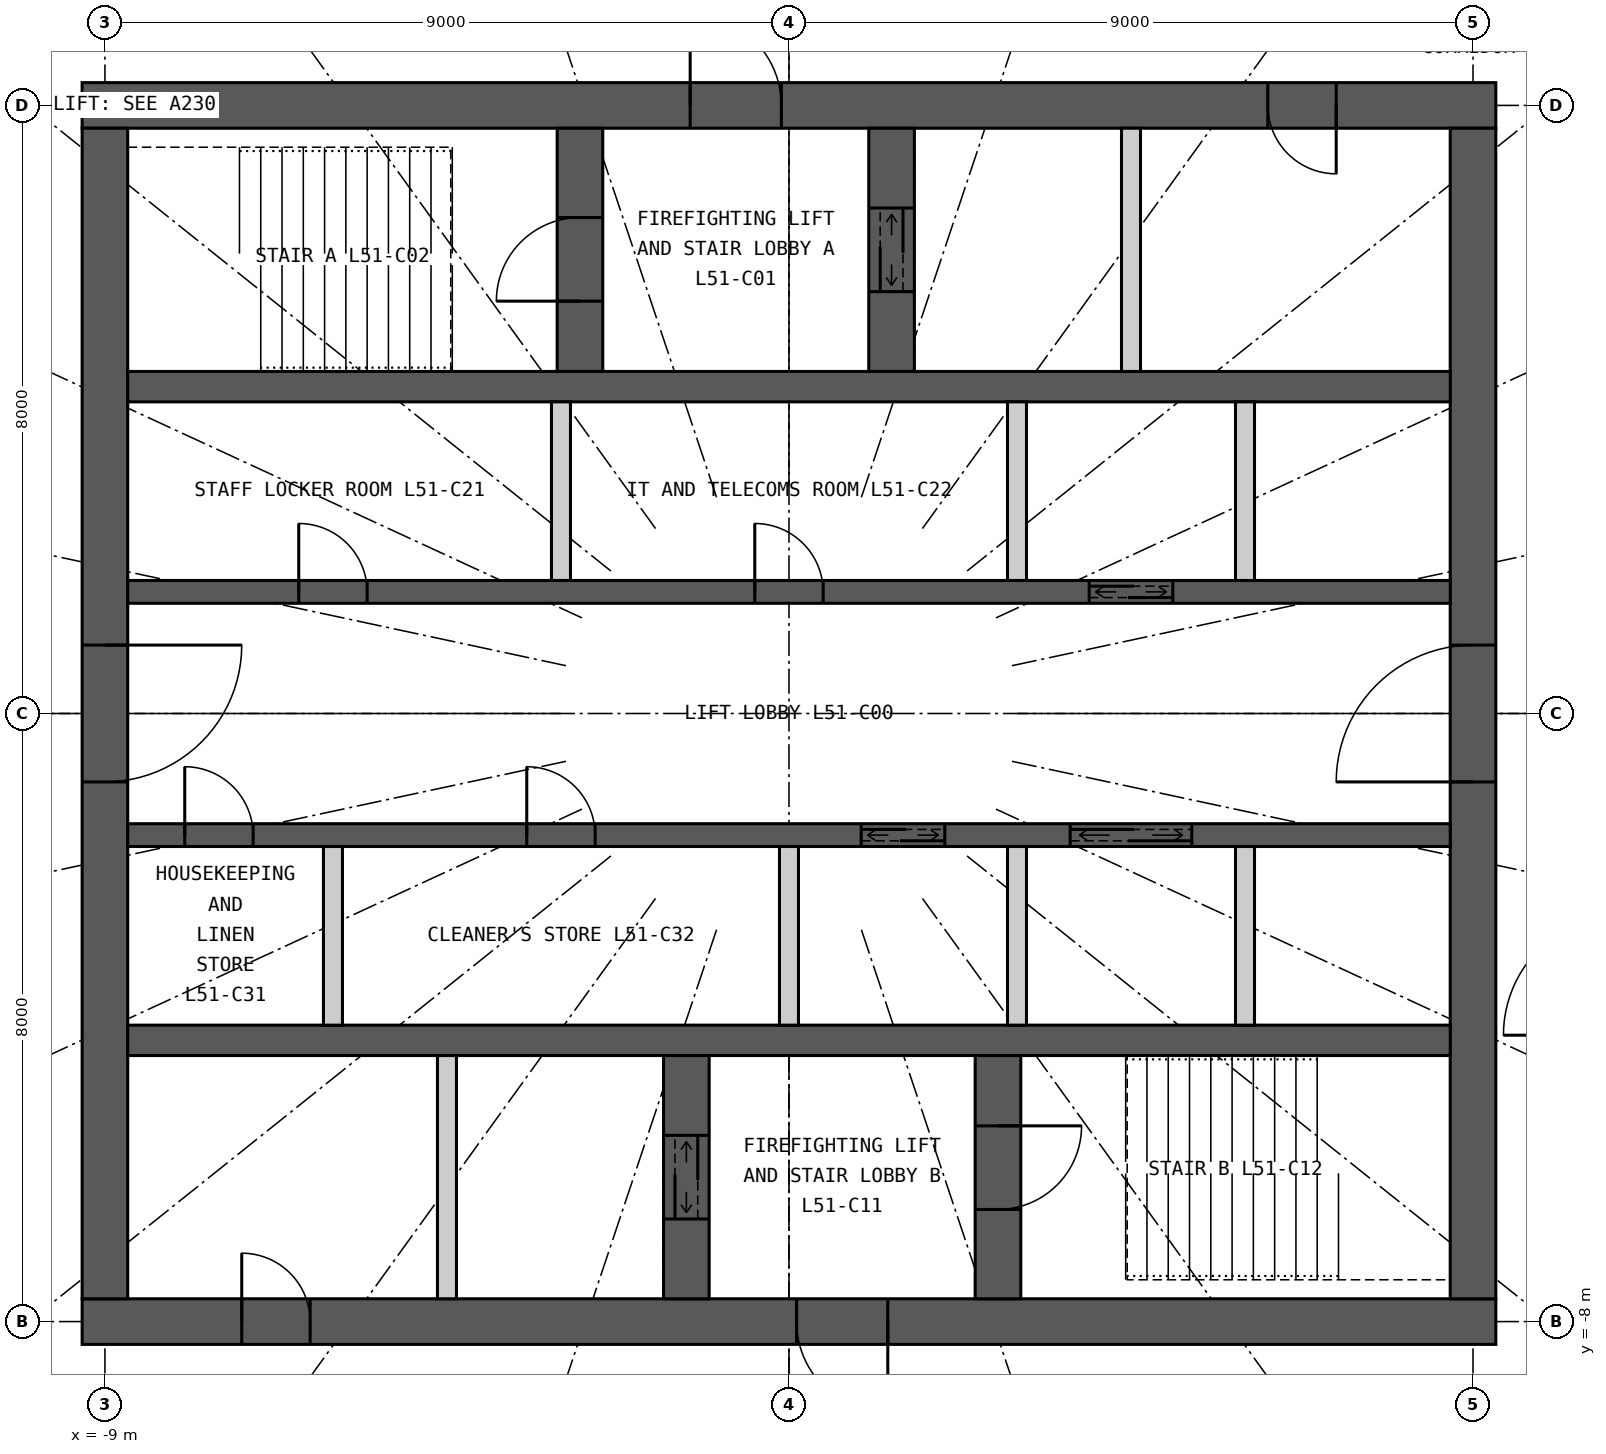
"""IFC4 building model, lengths in metres.
Left out: names, types, materials, properties, quantities, classifications, styles, units other than length and angle.
Written with IfcOpenShell. Run it as: python <this file> out.ifc"""

import sys

from ifc_helpers import new_model, si_unit, direction, frame, frame_2d, origin, place, context, subcontext, project, spatial, rectangle, extrude, element, fill, save


model = new_model("IFC4")
c1 = context("Model", 3, precision=1e-05, world=origin(), true_north=direction((0.0, 1.0)))
c2 = subcontext(c1, "Body", "Model", "MODEL_VIEW")
j1 = project(units=[si_unit("LENGTHUNIT", "METRE"), si_unit("PLANEANGLEUNIT", "RADIAN")], contexts=[c1])
p1 = place(None, origin())
s1 = spatial("IfcSite", under=j1, at=p1, CompositionType="ELEMENT")
p2 = place(p1, origin())
s2 = spatial("IfcBuilding", under=s1, at=p2, CompositionType="ELEMENT")
p3 = place(p2, frame((0.0, 0.0, 192.9)))
s3 = spatial("IfcBuildingStorey", under=s2, at=p3, CompositionType="ELEMENT", Elevation=192.9)
p4 = place(p3, frame((-9.3, 8.0, 0.0), z_axis=(0.0, 0.0, 1.0), x_axis=(1.0, 0.0, 0.0)))
e1 = element("IfcWall", 1, at=p4, inside=s3, PredefinedType="SHEAR", context=c2, shape_type="SweptSolid", body=[
    extrude(rectangle(XDim=18.6, YDim=0.6, at=frame_2d((9.3, 0.0))), origin(), (0.0, 0.0, 1.0), 3.3),
])
p5 = place(p4, frame((8.0, 0.0, 0.0)))
e2 = element("IfcOpeningElement", 2, at=p5, cuts=e1, PredefinedType="OPENING", context=c2, shape_type="SweptSolid", body=[
    extrude(rectangle(XDim=1.2, YDim=2.2, at=frame_2d((0.6, 1.1))), frame((0.0, 0.31, 0.0), z_axis=(0.0, -1.0, 0.0), x_axis=(1.0, 0.0, 0.0)), (0.0, 0.0, 1.0), 0.62),
])
p6 = place(p4, frame((15.6, 0.0, 0.0)))
e3 = element("IfcOpeningElement", 3, at=p6, cuts=e1, PredefinedType="OPENING", context=c2, shape_type="SweptSolid", body=[
    extrude(rectangle(XDim=0.9, YDim=2.2, at=frame_2d((0.45, 1.1))), frame((0.0, 0.31, 0.0), z_axis=(0.0, -1.0, 0.0), x_axis=(1.0, 0.0, 0.0)), (0.0, 0.0, 1.0), 0.62),
])
p7 = place(p3, frame((9.3, -8.0, 0.0), z_axis=(0.0, 0.0, 1.0), x_axis=(-1.0, 0.0, 0.0)))
e4 = element("IfcWall", 4, at=p7, inside=s3, PredefinedType="SHEAR", context=c2, shape_type="SweptSolid", body=[
    extrude(rectangle(XDim=18.6, YDim=0.6, at=frame_2d((9.3, 0.0))), origin(), (0.0, 0.0, 1.0), 3.3),
])
p8 = place(p7, frame((8.0, 0.0, 0.0)))
e5 = element("IfcOpeningElement", 5, at=p8, cuts=e4, PredefinedType="OPENING", context=c2, shape_type="SweptSolid", body=[
    extrude(rectangle(XDim=1.2, YDim=2.2, at=frame_2d((0.6, 1.1))), frame((0.0, 0.31, 0.0), z_axis=(0.0, -1.0, 0.0), x_axis=(1.0, 0.0, 0.0)), (0.0, 0.0, 1.0), 0.62),
])
p9 = place(p7, frame((15.6, 0.0, 0.0)))
e6 = element("IfcOpeningElement", 6, at=p9, cuts=e4, PredefinedType="OPENING", context=c2, shape_type="SweptSolid", body=[
    extrude(rectangle(XDim=0.9, YDim=2.2, at=frame_2d((0.45, 1.1))), frame((0.0, 0.31, 0.0), z_axis=(0.0, -1.0, 0.0), x_axis=(1.0, 0.0, 0.0)), (0.0, 0.0, 1.0), 0.62),
])
p10 = place(p3, frame((9.0, -7.7, 0.0), z_axis=(0.0, 0.0, 1.0), x_axis=(0.0, 1.0, 0.0)))
e7 = element("IfcWall", 7, at=p10, inside=s3, PredefinedType="SHEAR", context=c2, shape_type="SweptSolid", body=[
    extrude(rectangle(XDim=15.4, YDim=0.6, at=frame_2d((7.7, 0.0))), origin(), (0.0, 0.0, 1.0), 3.3),
])
p11 = place(p10, frame((6.8, 0.0, 0.0)))
e8 = element("IfcOpeningElement", 8, at=p11, cuts=e7, PredefinedType="OPENING", context=c2, shape_type="SweptSolid", body=[
    extrude(rectangle(XDim=1.8, YDim=2.2, at=frame_2d((0.9, 1.1))), frame((0.0, 0.31, 0.0), z_axis=(0.0, -1.0, 0.0), x_axis=(1.0, 0.0, 0.0)), (0.0, 0.0, 1.0), 0.62),
])
p12 = place(p3, frame((-9.0, 7.7, 0.0), z_axis=(0.0, 0.0, 1.0), x_axis=(0.0, -1.0, 0.0)))
e9 = element("IfcWall", 9, at=p12, inside=s3, PredefinedType="SHEAR", context=c2, shape_type="SweptSolid", body=[
    extrude(rectangle(XDim=15.4, YDim=0.6, at=frame_2d((7.7, 0.0))), origin(), (0.0, 0.0, 1.0), 3.3),
])
p13 = place(p12, frame((6.8, 0.0, 0.0)))
e10 = element("IfcOpeningElement", 10, at=p13, cuts=e9, PredefinedType="OPENING", context=c2, shape_type="SweptSolid", body=[
    extrude(rectangle(XDim=1.8, YDim=2.2, at=frame_2d((0.9, 1.1))), frame((0.0, 0.31, 0.0), z_axis=(0.0, -1.0, 0.0), x_axis=(1.0, 0.0, 0.0)), (0.0, 0.0, 1.0), 0.62),
])
p14 = place(p3, frame((-8.7, 4.3, 0.0), z_axis=(0.0, 0.0, 1.0), x_axis=(1.0, 0.0, 0.0)))
e11 = element("IfcWall", 11, at=p14, inside=s3, PredefinedType="SHEAR", context=c2, shape_type="SweptSolid", body=[
    extrude(rectangle(XDim=17.4, YDim=0.4, at=frame_2d((8.7, 0.0))), origin(), (0.0, 0.0, 1.0), 3.3),
])
p15 = place(p3, frame((-8.7, 1.6, 0.0), z_axis=(0.0, 0.0, 1.0), x_axis=(1.0, 0.0, 0.0)))
e12 = element("IfcWall", 12, at=p15, inside=s3, PredefinedType="SHEAR", context=c2, shape_type="SweptSolid", body=[
    extrude(rectangle(XDim=17.4, YDim=0.3, at=frame_2d((8.7, 0.0))), origin(), (0.0, 0.0, 1.0), 3.3),
])
p16 = place(p15, frame((12.65, 0.0, 0.0)))
e13 = element("IfcOpeningElement", 13, at=p16, cuts=e12, PredefinedType="OPENING", context=c2, shape_type="SweptSolid", body=[
    extrude(rectangle(XDim=1.1, YDim=2.2, at=frame_2d((0.55, 1.1))), frame((0.0, 0.16, 0.0), z_axis=(0.0, -1.0, 0.0), x_axis=(1.0, 0.0, 0.0)), (0.0, 0.0, 1.0), 0.32),
])
p17 = place(p15, frame((2.25, 0.0, 0.0)))
e14 = element("IfcOpeningElement", 14, at=p17, cuts=e12, PredefinedType="OPENING", context=c2, shape_type="SweptSolid", body=[
    extrude(rectangle(XDim=0.9, YDim=2.2, at=frame_2d((0.45, 1.1))), frame((0.0, 0.16, 0.0), z_axis=(0.0, -1.0, 0.0), x_axis=(1.0, 0.0, 0.0)), (0.0, 0.0, 1.0), 0.32),
])
p18 = place(p15, frame((8.25, 0.0, 0.0)))
e15 = element("IfcOpeningElement", 15, at=p18, cuts=e12, PredefinedType="OPENING", context=c2, shape_type="SweptSolid", body=[
    extrude(rectangle(XDim=0.9, YDim=2.2, at=frame_2d((0.45, 1.1))), frame((0.0, 0.16, 0.0), z_axis=(0.0, -1.0, 0.0), x_axis=(1.0, 0.0, 0.0)), (0.0, 0.0, 1.0), 0.32),
])
p19 = place(p3, frame((-8.7, -4.3, 0.0), z_axis=(0.0, 0.0, 1.0), x_axis=(1.0, 0.0, 0.0)))
e16 = element("IfcWall", 16, at=p19, inside=s3, PredefinedType="SHEAR", context=c2, shape_type="SweptSolid", body=[
    extrude(rectangle(XDim=17.4, YDim=0.4, at=frame_2d((8.7, 0.0))), origin(), (0.0, 0.0, 1.0), 3.3),
])
p20 = place(p3, frame((-8.7, -1.6, 0.0), z_axis=(0.0, 0.0, 1.0), x_axis=(1.0, 0.0, 0.0)))
e17 = element("IfcWall", 17, at=p20, inside=s3, PredefinedType="SHEAR", context=c2, shape_type="SweptSolid", body=[
    extrude(rectangle(XDim=17.4, YDim=0.3, at=frame_2d((8.7, 0.0))), origin(), (0.0, 0.0, 1.0), 3.3),
])
p21 = place(p20, frame((9.65, 0.0, 0.0)))
e18 = element("IfcOpeningElement", 18, at=p21, cuts=e17, PredefinedType="OPENING", context=c2, shape_type="SweptSolid", body=[
    extrude(rectangle(XDim=1.1, YDim=2.2, at=frame_2d((0.55, 1.1))), frame((0.0, 0.16, 0.0), z_axis=(0.0, -1.0, 0.0), x_axis=(1.0, 0.0, 0.0)), (0.0, 0.0, 1.0), 0.32),
])
p22 = place(p20, frame((12.4, 0.0, 0.0)))
e19 = element("IfcOpeningElement", 19, at=p22, cuts=e17, PredefinedType="OPENING", context=c2, shape_type="SweptSolid", body=[
    extrude(rectangle(XDim=1.6, YDim=2.4, at=frame_2d((0.8, 1.2))), frame((0.0, 0.16, 0.0), z_axis=(0.0, -1.0, 0.0), x_axis=(1.0, 0.0, 0.0)), (0.0, 0.0, 1.0), 0.32),
])
p23 = place(p20, frame((0.75, 0.0, 0.0)))
e20 = element("IfcOpeningElement", 20, at=p23, cuts=e17, PredefinedType="OPENING", context=c2, shape_type="SweptSolid", body=[
    extrude(rectangle(XDim=0.9, YDim=2.2, at=frame_2d((0.45, 1.1))), frame((0.0, 0.16, 0.0), z_axis=(0.0, -1.0, 0.0), x_axis=(1.0, 0.0, 0.0)), (0.0, 0.0, 1.0), 0.32),
])
p24 = place(p20, frame((5.25, 0.0, 0.0)))
e21 = element("IfcOpeningElement", 21, at=p24, cuts=e17, PredefinedType="OPENING", context=c2, shape_type="SweptSolid", body=[
    extrude(rectangle(XDim=0.9, YDim=2.2, at=frame_2d((0.45, 1.1))), frame((0.0, 0.16, 0.0), z_axis=(0.0, -1.0, 0.0), x_axis=(1.0, 0.0, 0.0)), (0.0, 0.0, 1.0), 0.32),
])
p25 = place(p3, frame((-2.75, 4.5, 0.0), z_axis=(0.0, 0.0, 1.0), x_axis=(0.0, 1.0, 0.0)))
e22 = element("IfcWall", 22, at=p25, inside=s3, PredefinedType="SHEAR", context=c2, shape_type="SweptSolid", body=[
    extrude(rectangle(XDim=3.2, YDim=0.6, at=frame_2d((1.6, 0.0))), origin(), (0.0, 0.0, 1.0), 3.3),
])
p26 = place(p25, frame((0.925, 0.0, 0.0)))
e23 = element("IfcOpeningElement", 23, at=p26, cuts=e22, PredefinedType="OPENING", context=c2, shape_type="SweptSolid", body=[
    extrude(rectangle(XDim=1.1, YDim=2.2, at=frame_2d((0.55, 1.1))), frame((0.0, 0.31, 0.0), z_axis=(0.0, -1.0, 0.0), x_axis=(1.0, 0.0, 0.0)), (0.0, 0.0, 1.0), 0.62),
])
p27 = place(p3, frame((1.35, 4.5, 0.0), z_axis=(0.0, 0.0, 1.0), x_axis=(0.0, 1.0, 0.0)))
e24 = element("IfcWall", 24, at=p27, inside=s3, PredefinedType="SHEAR", context=c2, shape_type="SweptSolid", body=[
    extrude(rectangle(XDim=3.2, YDim=0.6, at=frame_2d((1.6, 0.0))), origin(), (0.0, 0.0, 1.0), 3.3),
])
p28 = place(p27, frame((1.05, 0.0, 0.0)))
e25 = element("IfcOpeningElement", 25, at=p28, cuts=e24, PredefinedType="OPENING", context=c2, shape_type="SweptSolid", body=[
    extrude(rectangle(XDim=1.1, YDim=2.2, at=frame_2d((0.55, 1.1))), frame((0.0, 0.31, 0.0), z_axis=(0.0, -1.0, 0.0), x_axis=(1.0, 0.0, 0.0)), (0.0, 0.0, 1.0), 0.62),
])
p29 = place(p3, frame((4.5, 4.5, 0.0), z_axis=(0.0, 0.0, 1.0), x_axis=(0.0, 1.0, 0.0)))
e26 = element("IfcWall", 26, at=p29, inside=s3, PredefinedType="PARTITIONING", context=c2, shape_type="SweptSolid", body=[
    extrude(rectangle(XDim=3.2, YDim=0.25, at=frame_2d((1.6, 0.0))), origin(), (0.0, 0.0, 1.0), 3.3),
])
p30 = place(p3, frame((2.75, -7.7, 0.0), z_axis=(0.0, 0.0, 1.0), x_axis=(0.0, 1.0, 0.0)))
e27 = element("IfcWall", 27, at=p30, inside=s3, PredefinedType="SHEAR", context=c2, shape_type="SweptSolid", body=[
    extrude(rectangle(XDim=3.2, YDim=0.6, at=frame_2d((1.6, 0.0))), origin(), (0.0, 0.0, 1.0), 3.3),
])
p31 = place(p30, frame((1.175, 0.0, 0.0)))
e28 = element("IfcOpeningElement", 28, at=p31, cuts=e27, PredefinedType="OPENING", context=c2, shape_type="SweptSolid", body=[
    extrude(rectangle(XDim=1.1, YDim=2.2, at=frame_2d((0.55, 1.1))), frame((0.0, 0.31, 0.0), z_axis=(0.0, -1.0, 0.0), x_axis=(1.0, 0.0, 0.0)), (0.0, 0.0, 1.0), 0.62),
])
p32 = place(p3, frame((-1.35, -7.7, 0.0), z_axis=(0.0, 0.0, 1.0), x_axis=(0.0, 1.0, 0.0)))
e29 = element("IfcWall", 29, at=p32, inside=s3, PredefinedType="SHEAR", context=c2, shape_type="SweptSolid", body=[
    extrude(rectangle(XDim=3.2, YDim=0.6, at=frame_2d((1.6, 0.0))), origin(), (0.0, 0.0, 1.0), 3.3),
])
p33 = place(p32, frame((1.05, 0.0, 0.0)))
e30 = element("IfcOpeningElement", 30, at=p33, cuts=e29, PredefinedType="OPENING", context=c2, shape_type="SweptSolid", body=[
    extrude(rectangle(XDim=1.1, YDim=2.2, at=frame_2d((0.55, 1.1))), frame((0.0, 0.31, 0.0), z_axis=(0.0, -1.0, 0.0), x_axis=(1.0, 0.0, 0.0)), (0.0, 0.0, 1.0), 0.62),
])
p34 = place(p3, frame((-4.5, -7.7, 0.0), z_axis=(0.0, 0.0, 1.0), x_axis=(0.0, 1.0, 0.0)))
e31 = element("IfcWall", 31, at=p34, inside=s3, PredefinedType="PARTITIONING", context=c2, shape_type="SweptSolid", body=[
    extrude(rectangle(XDim=3.2, YDim=0.25, at=frame_2d((1.6, 0.0))), origin(), (0.0, 0.0, 1.0), 3.3),
])
for number, where, z_axis, x_axis in (
    (32, (-3.0, 1.75, 0.0), (0.0, 0.0, 1.0), (0.0, 1.0, 0.0)),
    (33, (3.0, 1.75, 0.0), (0.0, 0.0, 1.0), (0.0, 1.0, 0.0)),
    (34, (6.0, 1.75, 0.0), (0.0, 0.0, 1.0), (0.0, 1.0, 0.0)),
    (35, (-6.0, -4.1, 0.0), (0.0, 0.0, 1.0), (0.0, 1.0, 0.0)),
    (36, (0.0, -4.1, 0.0), (0.0, 0.0, 1.0), (0.0, 1.0, 0.0)),
    (37, (3.0, -4.1, 0.0), (0.0, 0.0, 1.0), (0.0, 1.0, 0.0)),
    (38, (6.0, -4.1, 0.0), (0.0, 0.0, 1.0), (0.0, 1.0, 0.0)),
):
    element("IfcWall", number, at=place(p3, frame(where, z_axis=z_axis, x_axis=x_axis)), inside=s3, PredefinedType="PARTITIONING", context=c2, shape_type="SweptSolid", body=[
        extrude(rectangle(XDim=2.35, YDim=0.25, at=frame_2d((1.175, 0.0))), origin(), (0.0, 0.0, 1.0), 3.3),
    ])
p35 = place(p5, origin())
e39 = element("IfcDoor", 39, at=p35, inside=s3, OperationType="SINGLE_SWING_LEFT", PredefinedType="DOOR", context=c2, shape_type="SweptSolid", body=[
    extrude(rectangle(XDim=1.2, YDim=2.2, at=frame_2d((0.6, 1.1))), frame((0.0, 0.025, 0.0), z_axis=(0.0, -1.0, 0.0), x_axis=(1.0, 0.0, 0.0)), (0.0, 0.0, 1.0), 0.05),
])
fill(e2, e39)
p36 = place(p26, origin())
e40 = element("IfcDoor", 40, at=p36, inside=s3, OperationType="SINGLE_SWING_LEFT", PredefinedType="DOOR", context=c2, shape_type="SweptSolid", body=[
    extrude(rectangle(XDim=1.1, YDim=2.2, at=frame_2d((0.55, 1.1))), frame((0.0, 0.025, 0.0), z_axis=(0.0, -1.0, 0.0), x_axis=(1.0, 0.0, 0.0)), (0.0, 0.0, 1.0), 0.05),
])
fill(e23, e40)
p37 = place(p28, origin())
e41 = element("IfcDoor", 41, at=p37, inside=s3, OperationType="DOUBLE_DOOR_SLIDING", PredefinedType="DOOR", context=c2, shape_type="SweptSolid", body=[
    extrude(rectangle(XDim=1.1, YDim=2.2, at=frame_2d((0.55, 1.1))), frame((0.0, 0.025, 0.0), z_axis=(0.0, -1.0, 0.0), x_axis=(1.0, 0.0, 0.0)), (0.0, 0.0, 1.0), 0.05),
])
fill(e25, e41)
p38 = place(p6, origin())
e42 = element("IfcDoor", 42, at=p38, inside=s3, OperationType="SINGLE_SWING_RIGHT", PredefinedType="DOOR", context=c2, shape_type="SweptSolid", body=[
    extrude(rectangle(XDim=0.9, YDim=2.2, at=frame_2d((0.45, 1.1))), frame((0.0, 0.025, 0.0), z_axis=(0.0, -1.0, 0.0), x_axis=(1.0, 0.0, 0.0)), (0.0, 0.0, 1.0), 0.05),
])
fill(e3, e42)
p39 = place(p8, origin())
e43 = element("IfcDoor", 43, at=p39, inside=s3, OperationType="SINGLE_SWING_LEFT", PredefinedType="DOOR", context=c2, shape_type="SweptSolid", body=[
    extrude(rectangle(XDim=1.2, YDim=2.2, at=frame_2d((0.6, 1.1))), frame((0.0, 0.025, 0.0), z_axis=(0.0, -1.0, 0.0), x_axis=(1.0, 0.0, 0.0)), (0.0, 0.0, 1.0), 0.05),
])
fill(e5, e43)
p40 = place(p31, origin())
e44 = element("IfcDoor", 44, at=p40, inside=s3, OperationType="SINGLE_SWING_RIGHT", PredefinedType="DOOR", context=c2, shape_type="SweptSolid", body=[
    extrude(rectangle(XDim=1.1, YDim=2.2, at=frame_2d((0.55, 1.1))), frame((0.0, 0.025, 0.0), z_axis=(0.0, -1.0, 0.0), x_axis=(1.0, 0.0, 0.0)), (0.0, 0.0, 1.0), 0.05),
])
fill(e28, e44)
p41 = place(p33, origin())
e45 = element("IfcDoor", 45, at=p41, inside=s3, OperationType="DOUBLE_DOOR_SLIDING", PredefinedType="DOOR", context=c2, shape_type="SweptSolid", body=[
    extrude(rectangle(XDim=1.1, YDim=2.2, at=frame_2d((0.55, 1.1))), frame((0.0, 0.025, 0.0), z_axis=(0.0, -1.0, 0.0), x_axis=(1.0, 0.0, 0.0)), (0.0, 0.0, 1.0), 0.05),
])
fill(e30, e45)
p42 = place(p9, origin())
e46 = element("IfcDoor", 46, at=p42, inside=s3, OperationType="SINGLE_SWING_RIGHT", PredefinedType="DOOR", context=c2, shape_type="SweptSolid", body=[
    extrude(rectangle(XDim=0.9, YDim=2.2, at=frame_2d((0.45, 1.1))), frame((0.0, 0.025, 0.0), z_axis=(0.0, -1.0, 0.0), x_axis=(1.0, 0.0, 0.0)), (0.0, 0.0, 1.0), 0.05),
])
fill(e6, e46)
p43 = place(p16, origin())
e47 = element("IfcDoor", 47, at=p43, inside=s3, OperationType="DOUBLE_DOOR_SLIDING", PredefinedType="DOOR", context=c2, shape_type="SweptSolid", body=[
    extrude(rectangle(XDim=1.1, YDim=2.2, at=frame_2d((0.55, 1.1))), frame((0.0, 0.025, 0.0), z_axis=(0.0, -1.0, 0.0), x_axis=(1.0, 0.0, 0.0)), (0.0, 0.0, 1.0), 0.05),
])
fill(e13, e47)
p44 = place(p21, origin())
e48 = element("IfcDoor", 48, at=p44, inside=s3, OperationType="DOUBLE_DOOR_SLIDING", PredefinedType="DOOR", context=c2, shape_type="SweptSolid", body=[
    extrude(rectangle(XDim=1.1, YDim=2.2, at=frame_2d((0.55, 1.1))), frame((0.0, 0.025, 0.0), z_axis=(0.0, -1.0, 0.0), x_axis=(1.0, 0.0, 0.0)), (0.0, 0.0, 1.0), 0.05),
])
fill(e18, e48)
p45 = place(p22, origin())
e49 = element("IfcDoor", 49, at=p45, inside=s3, OperationType="DOUBLE_DOOR_SLIDING", PredefinedType="DOOR", context=c2, shape_type="SweptSolid", body=[
    extrude(rectangle(XDim=1.6, YDim=2.4, at=frame_2d((0.8, 1.2))), frame((0.0, 0.025, 0.0), z_axis=(0.0, -1.0, 0.0), x_axis=(1.0, 0.0, 0.0)), (0.0, 0.0, 1.0), 0.05),
])
fill(e19, e49)
p46 = place(p17, origin())
e50 = element("IfcDoor", 50, at=p46, inside=s3, OperationType="SINGLE_SWING_LEFT", PredefinedType="DOOR", context=c2, shape_type="SweptSolid", body=[
    extrude(rectangle(XDim=0.9, YDim=2.2, at=frame_2d((0.45, 1.1))), frame((0.0, 0.025, 0.0), z_axis=(0.0, -1.0, 0.0), x_axis=(1.0, 0.0, 0.0)), (0.0, 0.0, 1.0), 0.05),
])
fill(e14, e50)
p47 = place(p18, origin())
e51 = element("IfcDoor", 51, at=p47, inside=s3, OperationType="SINGLE_SWING_LEFT", PredefinedType="DOOR", context=c2, shape_type="SweptSolid", body=[
    extrude(rectangle(XDim=0.9, YDim=2.2, at=frame_2d((0.45, 1.1))), frame((0.0, 0.025, 0.0), z_axis=(0.0, -1.0, 0.0), x_axis=(1.0, 0.0, 0.0)), (0.0, 0.0, 1.0), 0.05),
])
fill(e15, e51)
p48 = place(p23, origin())
e52 = element("IfcDoor", 52, at=p48, inside=s3, OperationType="SINGLE_SWING_LEFT", PredefinedType="DOOR", context=c2, shape_type="SweptSolid", body=[
    extrude(rectangle(XDim=0.9, YDim=2.2, at=frame_2d((0.45, 1.1))), frame((0.0, 0.025, 0.0), z_axis=(0.0, -1.0, 0.0), x_axis=(1.0, 0.0, 0.0)), (0.0, 0.0, 1.0), 0.05),
])
fill(e20, e52)
p49 = place(p24, origin())
e53 = element("IfcDoor", 53, at=p49, inside=s3, OperationType="SINGLE_SWING_LEFT", PredefinedType="DOOR", context=c2, shape_type="SweptSolid", body=[
    extrude(rectangle(XDim=0.9, YDim=2.2, at=frame_2d((0.45, 1.1))), frame((0.0, 0.025, 0.0), z_axis=(0.0, -1.0, 0.0), x_axis=(1.0, 0.0, 0.0)), (0.0, 0.0, 1.0), 0.05),
])
fill(e21, e53)
p50 = place(p11, origin())
e54 = element("IfcDoor", 54, at=p50, inside=s3, OperationType="DOUBLE_DOOR_DOUBLE_SWING", PredefinedType="DOOR", context=c2, shape_type="SweptSolid", body=[
    extrude(rectangle(XDim=1.8, YDim=2.2, at=frame_2d((0.9, 1.1))), frame((0.0, 0.025, 0.0), z_axis=(0.0, -1.0, 0.0), x_axis=(1.0, 0.0, 0.0)), (0.0, 0.0, 1.0), 0.05),
])
fill(e8, e54)
p51 = place(p13, origin())
e55 = element("IfcDoor", 55, at=p51, inside=s3, OperationType="DOUBLE_DOOR_DOUBLE_SWING", PredefinedType="DOOR", context=c2, shape_type="SweptSolid", body=[
    extrude(rectangle(XDim=1.8, YDim=2.2, at=frame_2d((0.9, 1.1))), frame((0.0, 0.025, 0.0), z_axis=(0.0, -1.0, 0.0), x_axis=(1.0, 0.0, 0.0)), (0.0, 0.0, 1.0), 0.05),
])
fill(e10, e55)
save(model, sys.argv[1])
